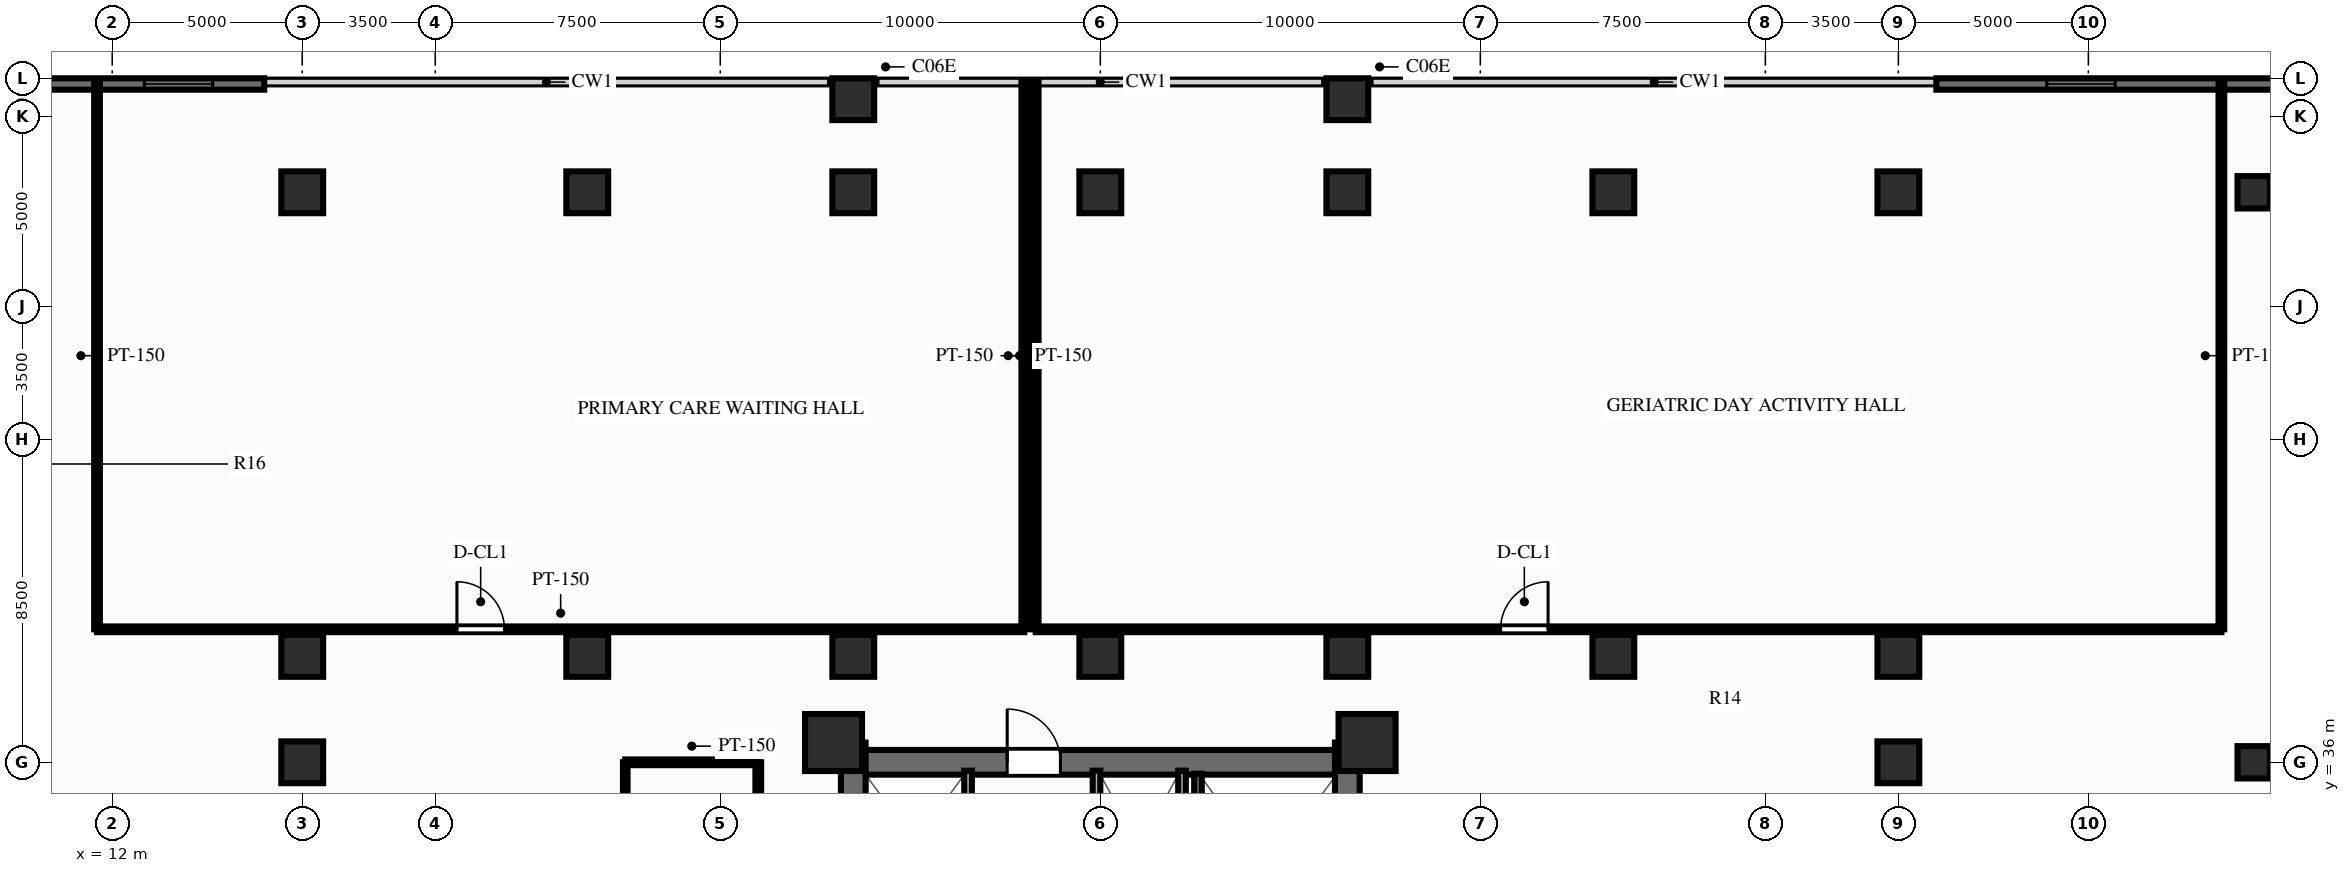
"""IFC4 building model, lengths in metres.
Left out: names, types, materials, properties, quantities, classifications, styles, units other than length and angle.
Written with IfcOpenShell. Run it as: python <this file> out.ifc"""

import sys

from ifc_helpers import new_model, si_unit, direction, frame, frame_2d, origin, origin_2d, place, context, subcontext, project, spatial, rectangle, circle, extrude, source, transform, mapped, element, fill, save


model = new_model("IFC4")
c1 = context("Model", 3, precision=1e-05, world=origin(), true_north=direction((0.0, 1.0)))
c2 = subcontext(c1, "Body", "Model", "MODEL_VIEW")
j1 = project(units=[si_unit("LENGTHUNIT", "METRE"), si_unit("PLANEANGLEUNIT", "RADIAN")], contexts=[c1])
p1 = place(None, origin())
s1 = spatial("IfcSite", under=j1, at=p1, CompositionType="ELEMENT")
p2 = place(p1, origin())
s2 = spatial("IfcBuilding", under=s1, at=p2, CompositionType="ELEMENT")
p3 = place(p2, frame((0.0, 0.0, 4.2)))
s3 = spatial("IfcBuildingStorey", under=s2, at=p3, CompositionType="ELEMENT", Elevation=4.2)
p4 = place(p3, frame((31.5, 17.48, 0.0), z_axis=(0.0, 0.0, 1.0), x_axis=(0.0, 1.0, 0.0)))
e1 = element("IfcWall", 1, at=p4, inside=s3, PredefinedType="SHEAR", context=c2, shape_type="SweptSolid", body=[
    extrude(rectangle(XDim=19.04, YDim=0.65, at=frame_2d((9.52, 0.0))), origin(), (0.0, 0.0, 1.0), 3.6),
])
p5 = place(p4, frame((6.32, 0.0, 0.0)))
e2 = element("IfcOpeningElement", 2, at=p5, cuts=e1, PredefinedType="OPENING", context=c2, shape_type="SweptSolid", body=[
    extrude(rectangle(XDim=1.1, YDim=2.15, at=frame_2d((0.55, 1.075))), frame((0.0, 0.337, 0.0), z_axis=(0.0, -1.0, 0.0), x_axis=(1.0, 0.0, 0.0)), (0.0, 0.0, 1.0), 0.674),
])
p6 = place(p3, frame((44.5, 17.48, 0.0), z_axis=(0.0, 0.0, 1.0), x_axis=(0.0, 1.0, 0.0)))
e3 = element("IfcWall", 3, at=p6, inside=s3, PredefinedType="SHEAR", context=c2, shape_type="SweptSolid", body=[
    extrude(rectangle(XDim=19.04, YDim=0.65, at=frame_2d((9.52, 0.0))), origin(), (0.0, 0.0, 1.0), 3.6),
])
p7 = place(p6, frame((12.67, 0.0, 0.0), z_axis=(0.0, 0.0, 1.0), x_axis=(-1.0, 0.0, 0.0)))
e4 = element("IfcOpeningElement", 4, at=p7, cuts=e3, PredefinedType="OPENING", context=c2, shape_type="SweptSolid", body=[
    extrude(rectangle(XDim=1.1, YDim=2.15, at=frame_2d((0.55, 1.075))), frame((0.0, 0.337, 0.0), z_axis=(0.0, -1.0, 0.0), x_axis=(1.0, 0.0, 0.0)), (0.0, 0.0, 1.0), 0.674),
])
p8 = place(p3, frame((31.825, 36.0, 0.0), z_axis=(0.0, 0.0, 1.0), x_axis=(1.0, 0.0, 0.0)))
e5 = element("IfcWall", 5, at=p8, inside=s3, PredefinedType="SHEAR", context=c2, shape_type="SweptSolid", body=[
    extrude(rectangle(XDim=12.35, YDim=0.65, at=frame_2d((6.175, 0.0))), origin(), (0.0, 0.0, 1.0), 3.6),
])
p9 = place(p8, frame((5.125, 0.0, 0.0), z_axis=(0.0, 0.0, 1.0), x_axis=(-1.0, 0.0, 0.0)))
e6 = element("IfcOpeningElement", 6, at=p9, cuts=e5, PredefinedType="OPENING", context=c2, shape_type="SweptSolid", body=[
    extrude(rectangle(XDim=1.4, YDim=2.15, at=frame_2d((0.7, 1.075))), frame((0.0, 0.337, 0.0), z_axis=(0.0, -1.0, 0.0), x_axis=(1.0, 0.0, 0.0)), (0.0, 0.0, 1.0), 0.674),
])
m1 = source(origin(), c2, "Body", "SweptSolid", [
    extrude(rectangle(XDim=1.5, YDim=1.5, at=origin_2d()), origin(), (0.0, 0.0, 1.0), 3.6),
])
for number, where, z_axis, x_axis in (
    (7, (30.98, 36.52, 0.0), (0.0, 0.0, 1.0), (1.0, 0.0, 0.0)),
    (8, (45.02, 36.52, 0.0), (0.0, 0.0, 1.0), (1.0, 0.0, 0.0)),
):
    element("IfcColumn", number, at=place(p3, frame(where, z_axis=z_axis, x_axis=x_axis)), inside=s3, PredefinedType="COLUMN", context=c2, shape_type="MappedRepresentation", body=[
        mapped(m1, transform((0.0, 0.0, 0.0), scale=1.0)),
    ])
m2 = source(origin(), c2, "Body", "SweptSolid", [
    extrude(circle(Radius=0.425, at=origin_2d()), origin(), (0.0, 0.0, 1.0), 3.6),
])
for number, where, z_axis, x_axis in (
    (9, (68.35, 36.0, 0.0), (0.0, 0.0, 1.0), (1.0, 0.0, 0.0)),
    (10, (68.35, 51.0, 0.0), (0.0, 0.0, 1.0), (1.0, 0.0, 0.0)),
):
    element("IfcColumn", number, at=place(p3, frame(where, z_axis=z_axis, x_axis=x_axis)), inside=s3, PredefinedType="COLUMN", context=c2, shape_type="MappedRepresentation", body=[
        mapped(m2, transform((0.0, 0.0, 0.0), scale=1.0)),
    ])
m3 = source(origin(), c2, "Body", "SweptSolid", [
    extrude(rectangle(XDim=1.1, YDim=1.1, at=origin_2d()), origin(), (0.0, 0.0, 1.0), 3.6),
])
for number, where, z_axis, x_axis in (
    (11, (17.0, 36.0, 0.0), (0.0, 0.0, 1.0), (1.0, 0.0, 0.0)),
    (12, (59.0, 36.0, 0.0), (0.0, 0.0, 1.0), (1.0, 0.0, 0.0)),
    (13, (17.0, 38.8, 0.0), (0.0, 0.0, 1.0), (1.0, 0.0, 0.0)),
    (14, (59.0, 38.8, 0.0), (0.0, 0.0, 1.0), (1.0, 0.0, 0.0)),
    (15, (17.0, 51.0, 0.0), (0.0, 0.0, 1.0), (1.0, 0.0, 0.0)),
    (16, (59.0, 51.0, 0.0), (0.0, 0.0, 1.0), (1.0, 0.0, 0.0)),
    (17, (24.5, 38.8, 0.0), (0.0, 0.0, 1.0), (1.0, 0.0, 0.0)),
    (18, (24.5, 51.0, 0.0), (0.0, 0.0, 1.0), (1.0, 0.0, 0.0)),
    (19, (31.5, 38.8, 0.0), (0.0, 0.0, 1.0), (1.0, 0.0, 0.0)),
    (20, (31.5, 51.0, 0.0), (0.0, 0.0, 1.0), (1.0, 0.0, 0.0)),
    (21, (31.5, 53.45, 0.0), (0.0, 0.0, 1.0), (1.0, 0.0, 0.0)),
    (22, (38.0, 38.8, 0.0), (0.0, 0.0, 1.0), (1.0, 0.0, 0.0)),
    (23, (38.0, 51.0, 0.0), (0.0, 0.0, 1.0), (1.0, 0.0, 0.0)),
    (24, (44.5, 38.8, 0.0), (0.0, 0.0, 1.0), (1.0, 0.0, 0.0)),
    (25, (44.5, 51.0, 0.0), (0.0, 0.0, 1.0), (1.0, 0.0, 0.0)),
    (26, (44.5, 53.45, 0.0), (0.0, 0.0, 1.0), (1.0, 0.0, 0.0)),
    (27, (51.5, 38.8, 0.0), (0.0, 0.0, 1.0), (1.0, 0.0, 0.0)),
    (28, (51.5, 51.0, 0.0), (0.0, 0.0, 1.0), (1.0, 0.0, 0.0)),
):
    element("IfcColumn", number, at=place(p3, frame(where, z_axis=z_axis, x_axis=x_axis)), inside=s3, PredefinedType="COLUMN", context=c2, shape_type="MappedRepresentation", body=[
        mapped(m3, transform((0.0, 0.0, 0.0), scale=1.0)),
    ])
p10 = place(p3, frame((0.0, 53.85, 0.0), z_axis=(0.0, 0.0, 1.0), x_axis=(1.0, 0.0, 0.0)))
e29 = element("IfcWall", 29, at=p10, inside=s3, PredefinedType="SOLIDWALL", context=c2, shape_type="SweptSolid", body=[
    extrude(rectangle(XDim=16.0, YDim=0.3, at=frame_2d((8.0, 0.0))), origin(), (0.0, 0.0, 1.0), 2.88),
])
p11 = place(p10, frame((4.955, 0.0, 0.85)))
e30 = element("IfcOpeningElement", 30, at=p11, cuts=e29, PredefinedType="OPENING", context=c2, shape_type="SweptSolid", body=[
    extrude(rectangle(XDim=1.8, YDim=1.65, at=frame_2d((0.9, 0.825))), frame((0.0, 0.162, 0.0), z_axis=(0.0, -1.0, 0.0), x_axis=(1.0, 0.0, 0.0)), (0.0, 0.0, 1.0), 0.324),
])
p12 = place(p10, frame((12.845, 0.0, 0.85)))
e31 = element("IfcOpeningElement", 31, at=p12, cuts=e29, PredefinedType="OPENING", context=c2, shape_type="SweptSolid", body=[
    extrude(rectangle(XDim=1.8, YDim=1.65, at=frame_2d((0.9, 0.825))), frame((0.0, 0.162, 0.0), z_axis=(0.0, -1.0, 0.0), x_axis=(1.0, 0.0, 0.0)), (0.0, 0.0, 1.0), 0.324),
])
p13 = place(p3, frame((60.0, 53.85, 0.0), z_axis=(0.0, 0.0, 1.0), x_axis=(1.0, 0.0, 0.0)))
e32 = element("IfcWall", 32, at=p13, inside=s3, PredefinedType="SOLIDWALL", context=c2, shape_type="SweptSolid", body=[
    extrude(rectangle(XDim=16.0, YDim=0.3, at=frame_2d((8.0, 0.0))), origin(), (0.0, 0.0, 1.0), 2.88),
])
p14 = place(p13, frame((2.905, 0.0, 0.85)))
e33 = element("IfcOpeningElement", 33, at=p14, cuts=e32, PredefinedType="OPENING", context=c2, shape_type="SweptSolid", body=[
    extrude(rectangle(XDim=1.8, YDim=1.65, at=frame_2d((0.9, 0.825))), frame((0.0, 0.162, 0.0), z_axis=(0.0, -1.0, 0.0), x_axis=(1.0, 0.0, 0.0)), (0.0, 0.0, 1.0), 0.324),
])
p15 = place(p13, frame((10.795, 0.0, 0.85)))
e34 = element("IfcOpeningElement", 34, at=p15, cuts=e32, PredefinedType="OPENING", context=c2, shape_type="SweptSolid", body=[
    extrude(rectangle(XDim=1.8, YDim=1.65, at=frame_2d((0.9, 0.825))), frame((0.0, 0.162, 0.0), z_axis=(0.0, -1.0, 0.0), x_axis=(1.0, 0.0, 0.0)), (0.0, 0.0, 1.0), 0.324),
])
p16 = place(p3, frame((40.15, 31.8, 0.0), z_axis=(0.0, 0.0, 1.0), x_axis=(0.0, 1.0, 0.0)))
e35 = element("IfcWall", 35, at=p16, inside=s3, PredefinedType="PARTITIONING", context=c2, shape_type="SweptSolid", body=[
    extrude(rectangle(XDim=3.98, YDim=0.2, at=frame_2d((1.99, 0.0))), origin(), (0.0, 0.0, 1.0), 3.32),
])
p17 = place(p3, frame((40.57, 28.65, 0.0), z_axis=(0.0, 0.0, 1.0), x_axis=(0.0, 1.0, 0.0)))
e36 = element("IfcWall", 36, at=p17, inside=s3, PredefinedType="SOLIDWALL", context=c2, shape_type="SweptSolid", body=[
    extrude(rectangle(XDim=7.05, YDim=0.2, at=frame_2d((3.525, 0.0))), origin(), (0.0, 0.0, 1.0), 3.32),
])
p18 = place(p3, frame((34.52, 25.44, 0.0), z_axis=(0.0, 0.0, 1.0), x_axis=(0.0, 1.0, 0.0)))
e37 = element("IfcWall", 37, at=p18, inside=s3, PredefinedType="PARTITIONING", context=c2, shape_type="SweptSolid", body=[
    extrude(rectangle(XDim=10.34, YDim=0.2, at=frame_2d((5.17, 0.0))), origin(), (0.0, 0.0, 1.0), 3.32),
])
p19 = place(p18, frame((0.32, 0.0, 0.0)))
e38 = element("IfcOpeningElement", 38, at=p19, cuts=e37, PredefinedType="OPENING", context=c2, shape_type="SweptSolid", body=[
    extrude(rectangle(XDim=1.0, YDim=2.15, at=frame_2d((0.5, 1.075))), frame((0.0, 0.112, 0.0), z_axis=(0.0, -1.0, 0.0), x_axis=(1.0, 0.0, 0.0)), (0.0, 0.0, 1.0), 0.224),
])
p20 = place(p18, frame((1.71, 0.0, 0.0)))
e39 = element("IfcOpeningElement", 39, at=p20, cuts=e37, PredefinedType="OPENING", context=c2, shape_type="SweptSolid", body=[
    extrude(rectangle(XDim=1.0, YDim=2.15, at=frame_2d((0.5, 1.075))), frame((0.0, 0.112, 0.0), z_axis=(0.0, -1.0, 0.0), x_axis=(1.0, 0.0, 0.0)), (0.0, 0.0, 1.0), 0.224),
])
p21 = place(p18, frame((3.535, 0.0, 0.0)))
e40 = element("IfcOpeningElement", 40, at=p21, cuts=e37, PredefinedType="OPENING", context=c2, shape_type="SweptSolid", body=[
    extrude(rectangle(XDim=1.0, YDim=2.15, at=frame_2d((0.5, 1.075))), frame((0.0, 0.112, 0.0), z_axis=(0.0, -1.0, 0.0), x_axis=(1.0, 0.0, 0.0)), (0.0, 0.0, 1.0), 0.224),
])
p22 = place(p18, frame((5.135, 0.0, 0.0)))
e41 = element("IfcOpeningElement", 41, at=p22, cuts=e37, PredefinedType="OPENING", context=c2, shape_type="SweptSolid", body=[
    extrude(rectangle(XDim=1.0, YDim=2.15, at=frame_2d((0.5, 1.075))), frame((0.0, 0.112, 0.0), z_axis=(0.0, -1.0, 0.0), x_axis=(1.0, 0.0, 0.0)), (0.0, 0.0, 1.0), 0.224),
])
p23 = place(p3, frame((37.9, 25.44, 0.0), z_axis=(0.0, 0.0, 1.0), x_axis=(0.0, 1.0, 0.0)))
e42 = element("IfcWall", 42, at=p23, inside=s3, PredefinedType="PARTITIONING", context=c2, shape_type="SweptSolid", body=[
    extrude(rectangle(XDim=10.34, YDim=0.2, at=frame_2d((5.17, 0.0))), origin(), (0.0, 0.0, 1.0), 3.32),
])
p24 = place(p3, frame((25.5, 18.0, 0.0), z_axis=(0.0, 0.0, 1.0), x_axis=(0.0, 1.0, 0.0)))
e43 = element("IfcWall", 43, at=p24, inside=s3, PredefinedType="PARTITIONING", context=c2, shape_type="SweptSolid", body=[
    extrude(rectangle(XDim=18.0, YDim=0.12, at=frame_2d((9.0, 0.0))), origin(), (0.0, 0.0, 1.0), 3.32),
])
p25 = place(p3, frame((29.0, 29.7, 0.0), z_axis=(0.0, 0.0, 1.0), x_axis=(0.0, 1.0, 0.0)))
e44 = element("IfcWall", 44, at=p25, inside=s3, PredefinedType="PARTITIONING", context=c2, shape_type="SweptSolid", body=[
    extrude(rectangle(XDim=6.3, YDim=0.15, at=frame_2d((3.15, 0.0))), origin(), (0.0, 0.0, 1.0), 3.32),
])
p26 = place(p25, frame((2.75, 0.0, 0.0)))
e45 = element("IfcOpeningElement", 45, at=p26, cuts=e44, PredefinedType="OPENING", context=c2, shape_type="SweptSolid", body=[
    extrude(rectangle(XDim=0.8, YDim=2.05, at=frame_2d((0.4, 1.025))), frame((0.0, 0.087, 0.0), z_axis=(0.0, -1.0, 0.0), x_axis=(1.0, 0.0, 0.0)), (0.0, 0.0, 1.0), 0.174),
])
p27 = place(p3, frame((25.5, 36.0, 0.0), z_axis=(0.0, 0.0, 1.0), x_axis=(1.0, 0.0, 0.0)))
e46 = element("IfcWall", 46, at=p27, inside=s3, PredefinedType="PARTITIONING", context=c2, shape_type="SweptSolid", body=[
    extrude(rectangle(XDim=3.5, YDim=0.15, at=frame_2d((1.75, 0.0))), origin(), (0.0, 0.0, 1.0), 2.69),
])
p28 = place(p3, frame((11.6, 39.5, 0.0), z_axis=(0.0, 0.0, 1.0), x_axis=(1.0, 0.0, 0.0)))
e47 = element("IfcWall", 47, at=p28, inside=s3, PredefinedType="PARTITIONING", context=c2, shape_type="SweptSolid", body=[
    extrude(rectangle(XDim=24.4, YDim=0.15, at=frame_2d((12.2, 0.0))), origin(), (0.0, 0.0, 1.0), 3.32),
])
p29 = place(p28, frame((9.47, 0.0, 0.0)))
e48 = element("IfcOpeningElement", 48, at=p29, cuts=e47, PredefinedType="OPENING", context=c2, shape_type="SweptSolid", body=[
    extrude(rectangle(XDim=1.25, YDim=2.15, at=frame_2d((0.625, 1.075))), frame((0.0, 0.087, 0.0), z_axis=(0.0, -1.0, 0.0), x_axis=(1.0, 0.0, 0.0)), (0.0, 0.0, 1.0), 0.174),
])
for number, where, z_axis, x_axis in (
    (49, (11.6, 39.5, 0.0), (0.0, 0.0, 1.0), (0.0, 1.0, 0.0)),
    (50, (36.0, 39.5, 0.0), (0.0, 0.0, 1.0), (0.0, 1.0, 0.0)),
):
    element("IfcWall", number, at=place(p3, frame(where, z_axis=z_axis, x_axis=x_axis)), inside=s3, PredefinedType="PARTITIONING", context=c2, shape_type="SweptSolid", body=[
        extrude(rectangle(XDim=14.4, YDim=0.15, at=frame_2d((7.2, 0.0))), origin(), (0.0, 0.0, 1.0), 3.32),
    ])
p30 = place(p3, frame((36.3, 39.5, 0.0), z_axis=(0.0, 0.0, 1.0), x_axis=(1.0, 0.0, 0.0)))
e51 = element("IfcWall", 51, at=p30, inside=s3, PredefinedType="PARTITIONING", context=c2, shape_type="SweptSolid", body=[
    extrude(rectangle(XDim=31.2, YDim=0.15, at=frame_2d((15.6, 0.0))), origin(), (0.0, 0.0, 1.0), 3.32),
])
p31 = place(p30, frame((12.233, 0.0, 0.0)))
e52 = element("IfcOpeningElement", 52, at=p31, cuts=e51, PredefinedType="OPENING", context=c2, shape_type="SweptSolid", body=[
    extrude(rectangle(XDim=1.25, YDim=2.15, at=frame_2d((0.625, 1.075))), frame((0.0, 0.087, 0.0), z_axis=(0.0, -1.0, 0.0), x_axis=(1.0, 0.0, 0.0)), (0.0, 0.0, 1.0), 0.174),
])
for number, where, z_axis, x_axis in (
    (53, (36.3, 39.5, 0.0), (0.0, 0.0, 1.0), (0.0, 1.0, 0.0)),
    (54, (67.5, 39.5, 0.0), (0.0, 0.0, 1.0), (0.0, 1.0, 0.0)),
):
    element("IfcWall", number, at=place(p3, frame(where, z_axis=z_axis, x_axis=x_axis)), inside=s3, PredefinedType="PARTITIONING", context=c2, shape_type="SweptSolid", body=[
        extrude(rectangle(XDim=14.4, YDim=0.15, at=frame_2d((7.2, 0.0))), origin(), (0.0, 0.0, 1.0), 3.32),
    ])
m4 = source(origin(), c2, "Body", "SweptSolid", [
    extrude(rectangle(XDim=1.8, YDim=1.65, at=frame_2d((0.9, 0.825))), frame((0.0, 0.03, 0.0), z_axis=(0.0, -1.0, 0.0), x_axis=(1.0, 0.0, 0.0)), (0.0, 0.0, 1.0), 0.06),
])
p32 = place(p12, origin())
e55 = element("IfcWindow", 55, at=p32, inside=s3, PartitioningType="SINGLE_PANEL", PredefinedType="WINDOW", context=c2, shape_type="MappedRepresentation", body=[
    mapped(m4, transform((0.0, 0.0, 0.0), scale=1.0)),
])
fill(e31, e55)
p33 = place(p14, origin())
e56 = element("IfcWindow", 56, at=p33, inside=s3, PartitioningType="SINGLE_PANEL", PredefinedType="WINDOW", context=c2, shape_type="MappedRepresentation", body=[
    mapped(m4, transform((0.0, 0.0, 0.0), scale=1.0)),
])
fill(e33, e56)
m5 = source(origin(), c2, "Body", "SweptSolid", [
    extrude(rectangle(XDim=1.4, YDim=2.15, at=frame_2d((0.7, 1.075))), frame((0.0, 0.025, 0.0), z_axis=(0.0, -1.0, 0.0), x_axis=(1.0, 0.0, 0.0)), (0.0, 0.0, 1.0), 0.05),
])
p34 = place(p9, origin())
e57 = element("IfcDoor", 57, at=p34, inside=s3, OperationType="SINGLE_SWING_RIGHT", PredefinedType="DOOR", context=c2, shape_type="MappedRepresentation", body=[
    mapped(m5, transform((0.0, 0.0, 0.0), scale=1.0)),
])
fill(e6, e57)
m6 = source(origin(), c2, "Body", "SweptSolid", [
    extrude(rectangle(XDim=1.25, YDim=2.15, at=frame_2d((0.625, 1.075))), frame((0.0, 0.025, 0.0), z_axis=(0.0, -1.0, 0.0), x_axis=(1.0, 0.0, 0.0)), (0.0, 0.0, 1.0), 0.05),
])
p35 = place(p29, origin())
e58 = element("IfcDoor", 58, at=p35, inside=s3, OperationType="SINGLE_SWING_LEFT", PredefinedType="DOOR", context=c2, shape_type="MappedRepresentation", body=[
    mapped(m6, transform((0.0, 0.0, 0.0), scale=1.0)),
])
fill(e48, e58)
p36 = place(p31, origin())
e59 = element("IfcDoor", 59, at=p36, inside=s3, OperationType="SINGLE_SWING_RIGHT", PredefinedType="DOOR", context=c2, shape_type="MappedRepresentation", body=[
    mapped(m6, transform((0.0, 0.0, 0.0), scale=1.0)),
])
fill(e52, e59)
save(model, sys.argv[1])
